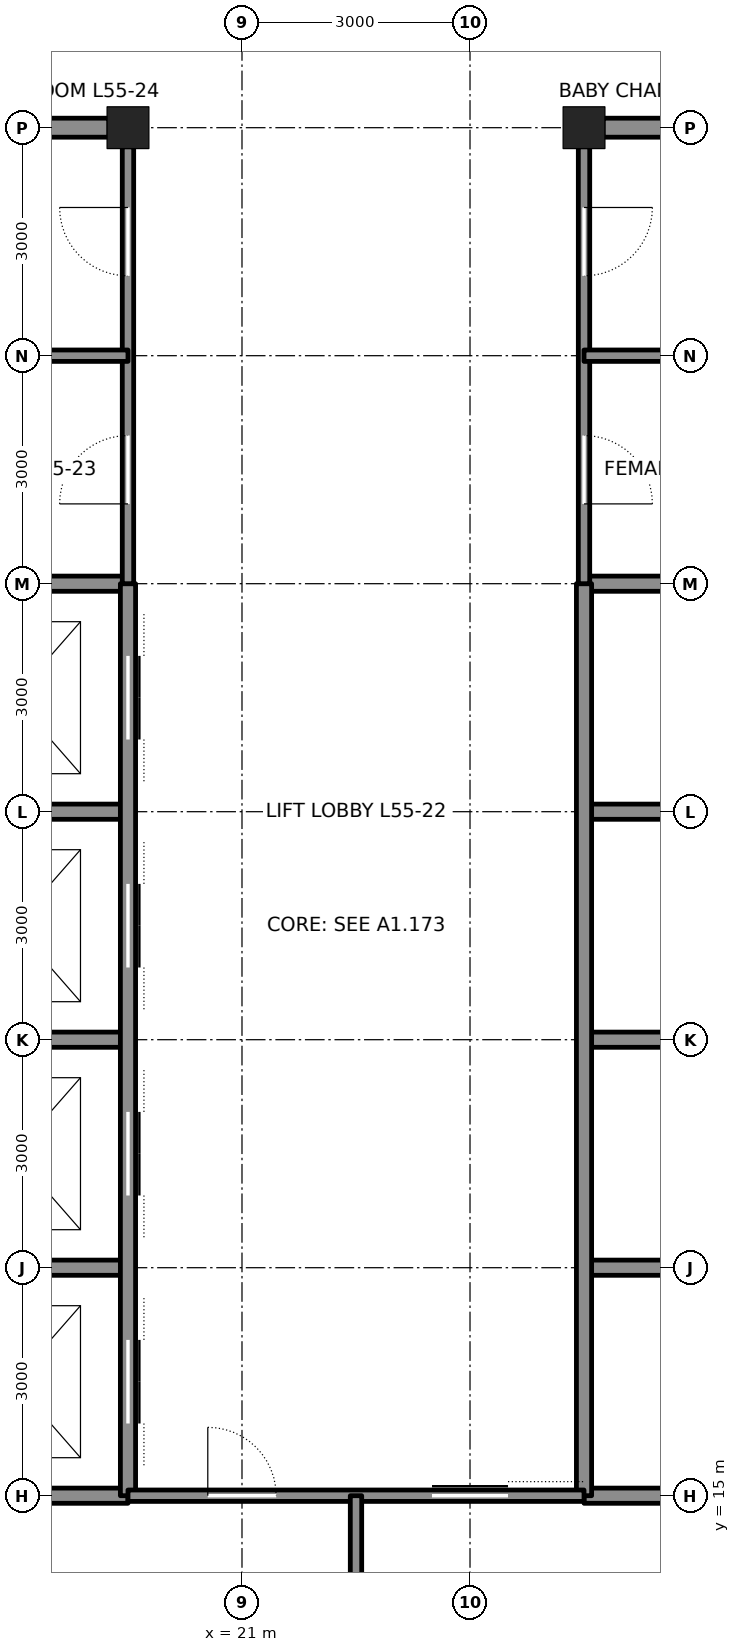
"""IFC4 building model, lengths in metres.
Left out: names, types, materials, properties, quantities, classifications, styles, units other than length and angle.
Written with IfcOpenShell. Run it as: python <this file> out.ifc"""

import sys

from ifc_helpers import new_model, si_unit, direction, frame, frame_2d, origin, origin_2d, place, context, subcontext, project, spatial, rectangle, hollow_rectangle, extrude, element, fill, save


model = new_model("IFC4")
c1 = context("Model", 3, precision=1e-05, world=origin(), true_north=direction((0.0, 1.0)))
c2 = subcontext(c1, "Body", "Model", "MODEL_VIEW")
j1 = project(units=[si_unit("LENGTHUNIT", "METRE"), si_unit("PLANEANGLEUNIT", "RADIAN")], contexts=[c1])
p1 = place(None, origin())
s1 = spatial("IfcSite", under=j1, at=p1, CompositionType="ELEMENT")
p2 = place(p1, origin())
s2 = spatial("IfcBuilding", under=s1, at=p2, CompositionType="ELEMENT")
p3 = place(p2, frame((0.0, 0.0, 247.5)))
s3 = spatial("IfcBuildingStorey", under=s2, at=p3, CompositionType="ELEMENT", Elevation=247.5)
for number, where, z_axis, x_axis in (
    (1, (19.5, 33.0, 0.0), (0.0, 0.0, 1.0), (1.0, 0.0, 0.0)),
    (2, (25.5, 33.0, 0.0), (0.0, 0.0, 1.0), (1.0, 0.0, 0.0)),
):
    element("IfcColumn", number, at=place(p3, frame(where, z_axis=z_axis, x_axis=x_axis)), inside=s3, PredefinedType="COLUMN", context=c2, shape_type="SweptSolid", body=[
        extrude(hollow_rectangle(XDim=0.55, YDim=0.55, WallThickness=0.045, at=origin_2d()), origin(), (0.0, 0.0, 1.0), 4.2),
    ])
for number, where, z_axis, x_axis in (
    (3, (12.0, 15.0, 0.0), (0.0, 0.0, 1.0), (1.0, 0.0, 0.0)),
    (4, (25.5, 15.0, 0.0), (0.0, 0.0, 1.0), (1.0, 0.0, 0.0)),
):
    element("IfcWall", number, at=place(p3, frame(where, z_axis=z_axis, x_axis=x_axis)), inside=s3, PredefinedType="SOLIDWALL", context=c2, shape_type="SweptSolid", body=[
        extrude(rectangle(XDim=7.5, YDim=0.2, at=frame_2d((3.75, 0.0))), origin(), (0.0, 0.0, 1.0), 4.04),
    ])
for number, where, z_axis, x_axis in (
    (5, (16.75, 24.0, 0.0), (0.0, 0.0, 1.0), (1.0, 0.0, 0.0)),
    (6, (25.5, 24.0, 0.0), (0.0, 0.0, 1.0), (1.0, 0.0, 0.0)),
):
    element("IfcWall", number, at=place(p3, frame(where, z_axis=z_axis, x_axis=x_axis)), inside=s3, PredefinedType="SOLIDWALL", context=c2, shape_type="SweptSolid", body=[
        extrude(rectangle(XDim=2.75, YDim=0.2, at=frame_2d((1.375, 0.0))), origin(), (0.0, 0.0, 1.0), 3.09),
    ])
p4 = place(p3, frame((12.0, 27.0, 0.0), z_axis=(0.0, 0.0, 1.0), x_axis=(1.0, 0.0, 0.0)))
e7 = element("IfcWall", 7, at=p4, inside=s3, PredefinedType="SOLIDWALL", context=c2, shape_type="SweptSolid", body=[
    extrude(rectangle(XDim=7.5, YDim=0.2, at=frame_2d((3.75, 0.0))), origin(), (0.0, 0.0, 1.0), 4.04),
])
p5 = place(p4, frame((1.65, 0.0, 0.0)))
e8 = element("IfcOpeningElement", 8, at=p5, cuts=e7, PredefinedType="OPENING", context=c2, shape_type="SweptSolid", body=[
    extrude(rectangle(XDim=1.2, YDim=2.1, at=frame_2d((0.6, 1.05))), frame((0.0, 0.11, 0.0), z_axis=(0.0, -1.0, 0.0), x_axis=(1.0, 0.0, 0.0)), (0.0, 0.0, 1.0), 0.22),
])
p6 = place(p3, frame((25.5, 27.0, 0.0), z_axis=(0.0, 0.0, 1.0), x_axis=(1.0, 0.0, 0.0)))
e9 = element("IfcWall", 9, at=p6, inside=s3, PredefinedType="SOLIDWALL", context=c2, shape_type="SweptSolid", body=[
    extrude(rectangle(XDim=3.0, YDim=0.2, at=frame_2d((1.5, 0.0))), origin(), (0.0, 0.0, 1.0), 4.04),
])
for number, where, z_axis, x_axis in (
    (10, (16.75, 33.0, 0.0), (0.0, 0.0, 1.0), (1.0, 0.0, 0.0)),
    (11, (25.75, 33.0, 0.0), (0.0, 0.0, 1.0), (1.0, 0.0, 0.0)),
):
    element("IfcWall", number, at=place(p3, frame(where, z_axis=z_axis, x_axis=x_axis)), inside=s3, PredefinedType="SOLIDWALL", context=c2, shape_type="SweptSolid", body=[
        extrude(rectangle(XDim=2.5, YDim=0.25, at=frame_2d((1.25, 0.0))), origin(), (0.0, 0.0, 1.0), 3.181),
    ])
p7 = place(p3, frame((16.5, 18.0, 0.0), z_axis=(0.0, 0.0, 1.0), x_axis=(1.0, 0.0, 0.0)))
e12 = element("IfcWall", 12, at=p7, inside=s3, PredefinedType="SOLIDWALL", context=c2, shape_type="SweptSolid", body=[
    extrude(rectangle(XDim=3.0, YDim=0.2, at=frame_2d((1.5, 0.0))), origin(), (0.0, 0.0, 1.0), 4.04),
])
p8 = place(p3, frame((25.5, 18.0, 0.0), z_axis=(0.0, 0.0, 1.0), x_axis=(1.0, 0.0, 0.0)))
e13 = element("IfcWall", 13, at=p8, inside=s3, PredefinedType="SOLIDWALL", context=c2, shape_type="SweptSolid", body=[
    extrude(rectangle(XDim=7.5, YDim=0.2, at=frame_2d((3.75, 0.0))), origin(), (0.0, 0.0, 1.0), 4.04),
])
p9 = place(p8, frame((4.65, 0.0, 0.0)))
e14 = element("IfcOpeningElement", 14, at=p9, cuts=e13, PredefinedType="OPENING", context=c2, shape_type="SweptSolid", body=[
    extrude(rectangle(XDim=1.2, YDim=2.1, at=frame_2d((0.6, 1.05))), frame((0.0, 0.11, 0.0), z_axis=(0.0, -1.0, 0.0), x_axis=(1.0, 0.0, 0.0)), (0.0, 0.0, 1.0), 0.22),
])
for number, where, z_axis, x_axis in (
    (15, (16.75, 21.0, 0.0), (0.0, 0.0, 1.0), (1.0, 0.0, 0.0)),
    (16, (25.5, 21.0, 0.0), (0.0, 0.0, 1.0), (1.0, 0.0, 0.0)),
):
    element("IfcWall", number, at=place(p3, frame(where, z_axis=z_axis, x_axis=x_axis)), inside=s3, PredefinedType="SOLIDWALL", context=c2, shape_type="SweptSolid", body=[
        extrude(rectangle(XDim=2.75, YDim=0.2, at=frame_2d((1.375, 0.0))), origin(), (0.0, 0.0, 1.0), 3.09),
    ])
p10 = place(p3, frame((19.5, 15.0, 0.0), z_axis=(0.0, 0.0, 1.0), x_axis=(0.0, 1.0, 0.0)))
e17 = element("IfcWall", 17, at=p10, inside=s3, PredefinedType="SOLIDWALL", context=c2, shape_type="SweptSolid", body=[
    extrude(rectangle(XDim=12.0, YDim=0.2, at=frame_2d((6.0, 0.0))), origin(), (0.0, 0.0, 1.0), 3.065),
])
p11 = place(p10, frame((0.95, 0.0, 0.0)))
e18 = element("IfcOpeningElement", 18, at=p11, cuts=e17, PredefinedType="OPENING", context=c2, shape_type="SweptSolid", body=[
    extrude(rectangle(XDim=1.1, YDim=2.1, at=frame_2d((0.55, 1.05))), frame((0.0, 0.11, 0.0), z_axis=(0.0, -1.0, 0.0), x_axis=(1.0, 0.0, 0.0)), (0.0, 0.0, 1.0), 0.22),
])
p12 = place(p10, frame((3.95, 0.0, 0.0)))
e19 = element("IfcOpeningElement", 19, at=p12, cuts=e17, PredefinedType="OPENING", context=c2, shape_type="SweptSolid", body=[
    extrude(rectangle(XDim=1.1, YDim=2.1, at=frame_2d((0.55, 1.05))), frame((0.0, 0.11, 0.0), z_axis=(0.0, -1.0, 0.0), x_axis=(1.0, 0.0, 0.0)), (0.0, 0.0, 1.0), 0.22),
])
p13 = place(p10, frame((6.95, 0.0, 0.0)))
e20 = element("IfcOpeningElement", 20, at=p13, cuts=e17, PredefinedType="OPENING", context=c2, shape_type="SweptSolid", body=[
    extrude(rectangle(XDim=1.1, YDim=2.1, at=frame_2d((0.55, 1.05))), frame((0.0, 0.11, 0.0), z_axis=(0.0, -1.0, 0.0), x_axis=(1.0, 0.0, 0.0)), (0.0, 0.0, 1.0), 0.22),
])
p14 = place(p10, frame((9.95, 0.0, 0.0)))
e21 = element("IfcOpeningElement", 21, at=p14, cuts=e17, PredefinedType="OPENING", context=c2, shape_type="SweptSolid", body=[
    extrude(rectangle(XDim=1.1, YDim=2.1, at=frame_2d((0.55, 1.05))), frame((0.0, 0.11, 0.0), z_axis=(0.0, -1.0, 0.0), x_axis=(1.0, 0.0, 0.0)), (0.0, 0.0, 1.0), 0.22),
])
p15 = place(p3, frame((19.5, 27.0, 0.0), z_axis=(0.0, 0.0, 1.0), x_axis=(0.0, 1.0, 0.0)))
e22 = element("IfcWall", 22, at=p15, inside=s3, PredefinedType="PARTITIONING", context=c2, shape_type="SweptSolid", body=[
    extrude(rectangle(XDim=5.75, YDim=0.15, at=frame_2d((2.875, 0.0))), origin(), (0.0, 0.0, 1.0), 3.065),
])
p16 = place(p15, frame((1.05, 0.0, 0.0)))
e23 = element("IfcOpeningElement", 23, at=p16, cuts=e22, PredefinedType="OPENING", context=c2, shape_type="SweptSolid", body=[
    extrude(rectangle(XDim=0.9, YDim=2.1, at=frame_2d((0.45, 1.05))), frame((0.0, 0.085, 0.0), z_axis=(0.0, -1.0, 0.0), x_axis=(1.0, 0.0, 0.0)), (0.0, 0.0, 1.0), 0.17),
])
p17 = place(p15, frame((4.05, 0.0, 0.0)))
e24 = element("IfcOpeningElement", 24, at=p17, cuts=e22, PredefinedType="OPENING", context=c2, shape_type="SweptSolid", body=[
    extrude(rectangle(XDim=0.9, YDim=2.1, at=frame_2d((0.45, 1.05))), frame((0.0, 0.085, 0.0), z_axis=(0.0, -1.0, 0.0), x_axis=(1.0, 0.0, 0.0)), (0.0, 0.0, 1.0), 0.17),
])
p18 = place(p3, frame((25.5, 15.0, 0.0), z_axis=(0.0, 0.0, 1.0), x_axis=(0.0, 1.0, 0.0)))
e25 = element("IfcWall", 25, at=p18, inside=s3, PredefinedType="SOLIDWALL", context=c2, shape_type="SweptSolid", body=[
    extrude(rectangle(XDim=12.0, YDim=0.2, at=frame_2d((6.0, 0.0))), origin(), (0.0, 0.0, 1.0), 3.065),
])
p19 = place(p3, frame((25.5, 27.0, 0.0), z_axis=(0.0, 0.0, 1.0), x_axis=(0.0, 1.0, 0.0)))
e26 = element("IfcWall", 26, at=p19, inside=s3, PredefinedType="PARTITIONING", context=c2, shape_type="SweptSolid", body=[
    extrude(rectangle(XDim=5.75, YDim=0.15, at=frame_2d((2.875, 0.0))), origin(), (0.0, 0.0, 1.0), 3.065),
])
p20 = place(p19, frame((1.05, 0.0, 0.0)))
e27 = element("IfcOpeningElement", 27, at=p20, cuts=e26, PredefinedType="OPENING", context=c2, shape_type="SweptSolid", body=[
    extrude(rectangle(XDim=0.9, YDim=2.1, at=frame_2d((0.45, 1.05))), frame((0.0, 0.085, 0.0), z_axis=(0.0, -1.0, 0.0), x_axis=(1.0, 0.0, 0.0)), (0.0, 0.0, 1.0), 0.17),
])
p21 = place(p19, frame((4.05, 0.0, 0.0)))
e28 = element("IfcOpeningElement", 28, at=p21, cuts=e26, PredefinedType="OPENING", context=c2, shape_type="SweptSolid", body=[
    extrude(rectangle(XDim=0.9, YDim=2.1, at=frame_2d((0.45, 1.05))), frame((0.0, 0.085, 0.0), z_axis=(0.0, -1.0, 0.0), x_axis=(1.0, 0.0, 0.0)), (0.0, 0.0, 1.0), 0.17),
])
p22 = place(p3, frame((19.5, 15.0, 0.0), z_axis=(0.0, 0.0, 1.0), x_axis=(1.0, 0.0, 0.0)))
e29 = element("IfcWall", 29, at=p22, inside=s3, PredefinedType="PARTITIONING", context=c2, shape_type="SweptSolid", body=[
    extrude(rectangle(XDim=6.0, YDim=0.15, at=frame_2d((3.0, 0.0))), origin(), (0.0, 0.0, 1.0), 4.04),
])
p23 = place(p22, frame((4.0, 0.0, 0.0)))
e30 = element("IfcOpeningElement", 30, at=p23, cuts=e29, PredefinedType="OPENING", context=c2, shape_type="SweptSolid", body=[
    extrude(rectangle(XDim=1.0, YDim=2.1, at=frame_2d((0.5, 1.05))), frame((0.0, 0.085, 0.0), z_axis=(0.0, -1.0, 0.0), x_axis=(1.0, 0.0, 0.0)), (0.0, 0.0, 1.0), 0.17),
])
p24 = place(p22, frame((1.05, 0.0, 0.0)))
e31 = element("IfcOpeningElement", 31, at=p24, cuts=e29, PredefinedType="OPENING", context=c2, shape_type="SweptSolid", body=[
    extrude(rectangle(XDim=0.9, YDim=2.1, at=frame_2d((0.45, 1.05))), frame((0.0, 0.085, 0.0), z_axis=(0.0, -1.0, 0.0), x_axis=(1.0, 0.0, 0.0)), (0.0, 0.0, 1.0), 0.17),
])
for number, where, z_axis, x_axis in (
    (32, (22.5, 15.0, 0.0), (0.0, 0.0, 1.0), (0.0, -1.0, 0.0)),
    (33, (16.5, 30.0, 0.0), (0.0, 0.0, 1.0), (1.0, 0.0, 0.0)),
    (34, (25.5, 30.0, 0.0), (0.0, 0.0, 1.0), (1.0, 0.0, 0.0)),
):
    element("IfcWall", number, at=place(p3, frame(where, z_axis=z_axis, x_axis=x_axis)), inside=s3, PredefinedType="PARTITIONING", context=c2, shape_type="SweptSolid", body=[
        extrude(rectangle(XDim=3.0, YDim=0.15, at=frame_2d((1.5, 0.0))), origin(), (0.0, 0.0, 1.0), 4.04),
    ])
p25 = place(p16, origin())
e35 = element("IfcDoor", 35, at=p25, inside=s3, OperationType="SINGLE_SWING_LEFT", PredefinedType="DOOR", context=c2, shape_type="SweptSolid", body=[
    extrude(rectangle(XDim=0.9, YDim=2.1, at=frame_2d((0.45, 1.05))), frame((0.0, 0.025, 0.0), z_axis=(0.0, -1.0, 0.0), x_axis=(1.0, 0.0, 0.0)), (0.0, 0.0, 1.0), 0.05),
])
fill(e23, e35)
p26 = place(p17, origin())
e36 = element("IfcDoor", 36, at=p26, inside=s3, OperationType="SINGLE_SWING_RIGHT", PredefinedType="DOOR", context=c2, shape_type="SweptSolid", body=[
    extrude(rectangle(XDim=0.9, YDim=2.1, at=frame_2d((0.45, 1.05))), frame((0.0, 0.025, 0.0), z_axis=(0.0, -1.0, 0.0), x_axis=(1.0, 0.0, 0.0)), (0.0, 0.0, 1.0), 0.05),
])
fill(e24, e36)
p27 = place(p20, frame((0.9, 0.0, 0.0), z_axis=(0.0, 0.0, 1.0), x_axis=(-1.0, 0.0, 0.0)))
e37 = element("IfcDoor", 37, at=p27, inside=s3, OperationType="SINGLE_SWING_RIGHT", PredefinedType="DOOR", context=c2, shape_type="SweptSolid", body=[
    extrude(rectangle(XDim=0.9, YDim=2.1, at=frame_2d((0.45, 1.05))), frame((0.0, 0.025, 0.0), z_axis=(0.0, -1.0, 0.0), x_axis=(1.0, 0.0, 0.0)), (0.0, 0.0, 1.0), 0.05),
])
fill(e27, e37)
p28 = place(p21, frame((0.9, 0.0, 0.0), z_axis=(0.0, 0.0, 1.0), x_axis=(-1.0, 0.0, 0.0)))
e38 = element("IfcDoor", 38, at=p28, inside=s3, OperationType="SINGLE_SWING_LEFT", PredefinedType="DOOR", context=c2, shape_type="SweptSolid", body=[
    extrude(rectangle(XDim=0.9, YDim=2.1, at=frame_2d((0.45, 1.05))), frame((0.0, 0.025, 0.0), z_axis=(0.0, -1.0, 0.0), x_axis=(1.0, 0.0, 0.0)), (0.0, 0.0, 1.0), 0.05),
])
fill(e28, e38)
p29 = place(p23, origin())
e39 = element("IfcDoor", 39, at=p29, inside=s3, OperationType="SLIDING_TO_LEFT", PredefinedType="DOOR", context=c2, shape_type="SweptSolid", body=[
    extrude(rectangle(XDim=1.0, YDim=2.1, at=frame_2d((0.5, 1.05))), frame((0.0, 0.025, 0.0), z_axis=(0.0, -1.0, 0.0), x_axis=(1.0, 0.0, 0.0)), (0.0, 0.0, 1.0), 0.05),
])
fill(e30, e39)
p30 = place(p24, origin())
e40 = element("IfcDoor", 40, at=p30, inside=s3, OperationType="SINGLE_SWING_LEFT", PredefinedType="DOOR", context=c2, shape_type="SweptSolid", body=[
    extrude(rectangle(XDim=0.9, YDim=2.1, at=frame_2d((0.45, 1.05))), frame((0.0, 0.025, 0.0), z_axis=(0.0, -1.0, 0.0), x_axis=(1.0, 0.0, 0.0)), (0.0, 0.0, 1.0), 0.05),
])
fill(e31, e40)
p31 = place(p11, origin())
e41 = element("IfcDoor", 41, at=p31, inside=s3, OperationType="DOUBLE_DOOR_SLIDING", PredefinedType="DOOR", context=c2, shape_type="SweptSolid", body=[
    extrude(rectangle(XDim=1.1, YDim=2.1, at=frame_2d((0.55, 1.05))), frame((0.0, 0.025, 0.0), z_axis=(0.0, -1.0, 0.0), x_axis=(1.0, 0.0, 0.0)), (0.0, 0.0, 1.0), 0.05),
])
fill(e18, e41)
p32 = place(p12, origin())
e42 = element("IfcDoor", 42, at=p32, inside=s3, OperationType="DOUBLE_DOOR_SLIDING", PredefinedType="DOOR", context=c2, shape_type="SweptSolid", body=[
    extrude(rectangle(XDim=1.1, YDim=2.1, at=frame_2d((0.55, 1.05))), frame((0.0, 0.025, 0.0), z_axis=(0.0, -1.0, 0.0), x_axis=(1.0, 0.0, 0.0)), (0.0, 0.0, 1.0), 0.05),
])
fill(e19, e42)
p33 = place(p13, origin())
e43 = element("IfcDoor", 43, at=p33, inside=s3, OperationType="DOUBLE_DOOR_SLIDING", PredefinedType="DOOR", context=c2, shape_type="SweptSolid", body=[
    extrude(rectangle(XDim=1.1, YDim=2.1, at=frame_2d((0.55, 1.05))), frame((0.0, 0.025, 0.0), z_axis=(0.0, -1.0, 0.0), x_axis=(1.0, 0.0, 0.0)), (0.0, 0.0, 1.0), 0.05),
])
fill(e20, e43)
p34 = place(p14, origin())
e44 = element("IfcDoor", 44, at=p34, inside=s3, OperationType="DOUBLE_DOOR_SLIDING", PredefinedType="DOOR", context=c2, shape_type="SweptSolid", body=[
    extrude(rectangle(XDim=1.1, YDim=2.1, at=frame_2d((0.55, 1.05))), frame((0.0, 0.025, 0.0), z_axis=(0.0, -1.0, 0.0), x_axis=(1.0, 0.0, 0.0)), (0.0, 0.0, 1.0), 0.05),
])
fill(e21, e44)
save(model, sys.argv[1])
